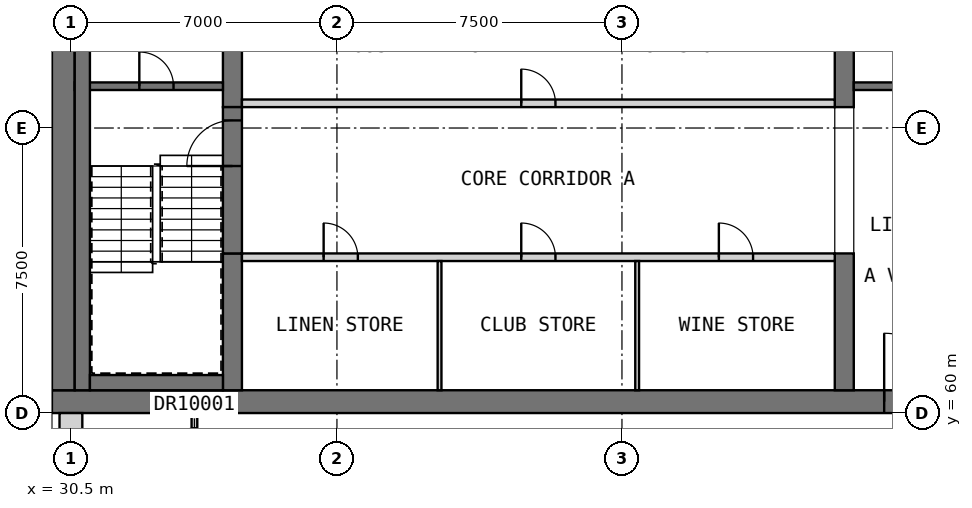
"""IFC4 building model, lengths in metres.
Left out: names, types, materials, properties, quantities, classifications, styles, units other than length and angle.
Written with IfcOpenShell. Run it as: python <this file> out.ifc"""

import sys

from ifc_helpers import new_model, si_unit, direction, frame, frame_2d, origin, place, context, subcontext, project, spatial, rectangle, extrude, element, fill, save


model = new_model("IFC4")
c1 = context("Model", 3, precision=1e-05, world=origin(), true_north=direction((0.0, 1.0)))
c2 = subcontext(c1, "Body", "Model", "MODEL_VIEW")
j1 = project(units=[si_unit("LENGTHUNIT", "METRE"), si_unit("PLANEANGLEUNIT", "RADIAN")], contexts=[c1])
p1 = place(None, origin())
s1 = spatial("IfcSite", under=j1, at=p1, CompositionType="ELEMENT")
p2 = place(p1, origin())
s2 = spatial("IfcBuilding", under=s1, at=p2, CompositionType="ELEMENT")
p3 = place(p2, frame((0.0, 0.0, 283.7)))
s3 = spatial("IfcBuildingStorey", under=s2, at=p3, CompositionType="ELEMENT", Elevation=283.7)
p4 = place(p3, frame((30.0, 60.3, 0.0), z_axis=(0.0, 0.0, 1.0), x_axis=(1.0, 0.0, 0.0)))
e1 = element("IfcWall", 1, at=p4, inside=s3, PredefinedType="SHEAR", context=c2, shape_type="SweptSolid", body=[
    extrude(rectangle(XDim=30.0, YDim=0.6, at=frame_2d((15.0, 0.0))), origin(), (0.0, 0.0, 1.0), 3.5),
])
p5 = place(p4, frame((21.9, 0.0, 0.0)))
e2 = element("IfcOpeningElement", 2, at=p5, cuts=e1, PredefinedType="OPENING", context=c2, shape_type="SweptSolid", body=[
    extrude(rectangle(XDim=1.8, YDim=2.1, at=frame_2d((0.9, 1.05))), frame((0.0, 0.31, 0.0), z_axis=(0.0, -1.0, 0.0), x_axis=(1.0, 0.0, 0.0)), (0.0, 0.0, 1.0), 0.62),
])
p6 = place(p4, frame((26.5, 0.0, 0.0)))
e3 = element("IfcOpeningElement", 3, at=p6, cuts=e1, PredefinedType="OPENING", context=c2, shape_type="SweptSolid", body=[
    extrude(rectangle(XDim=1.2, YDim=2.1, at=frame_2d((0.6, 1.05))), frame((0.0, 0.31, 0.0), z_axis=(0.0, -1.0, 0.0), x_axis=(1.0, 0.0, 0.0)), (0.0, 0.0, 1.0), 0.62),
])
p7 = place(p3, frame((30.3, 60.6, 0.0), z_axis=(0.0, 0.0, 1.0), x_axis=(0.0, 1.0, 0.0)))
e4 = element("IfcWall", 4, at=p7, inside=s3, PredefinedType="SHEAR", context=c2, shape_type="SweptSolid", body=[
    extrude(rectangle(XDim=21.3, YDim=0.6, at=frame_2d((10.65, 0.0))), origin(), (0.0, 0.0, 1.0), 3.5),
])
p8 = place(p3, frame((34.75, 60.6, 0.0), z_axis=(0.0, 0.0, 1.0), x_axis=(0.0, 1.0, 0.0)))
e5 = element("IfcWall", 5, at=p8, inside=s3, PredefinedType="SHEAR", context=c2, shape_type="SweptSolid", body=[
    extrude(rectangle(XDim=3.6, YDim=0.5, at=frame_2d((1.8, 0.0))), origin(), (0.0, 0.0, 1.0), 3.5),
])
p9 = place(p3, frame((34.75, 68.05, 0.0), z_axis=(0.0, 0.0, 1.0), x_axis=(0.0, 1.0, 0.0)))
e6 = element("IfcWall", 6, at=p9, inside=s3, PredefinedType="SHEAR", context=c2, shape_type="SweptSolid", body=[
    extrude(rectangle(XDim=6.4, YDim=0.5, at=frame_2d((3.2, 0.0))), origin(), (0.0, 0.0, 1.0), 3.5),
])
p10 = place(p3, frame((50.85, 60.6, 0.0), z_axis=(0.0, 0.0, 1.0), x_axis=(0.0, 1.0, 0.0)))
e7 = element("IfcWall", 7, at=p10, inside=s3, PredefinedType="SHEAR", context=c2, shape_type="SweptSolid", body=[
    extrude(rectangle(XDim=3.6, YDim=0.5, at=frame_2d((1.8, 0.0))), origin(), (0.0, 0.0, 1.0), 3.5),
])
p11 = place(p3, frame((50.85, 68.05, 0.0), z_axis=(0.0, 0.0, 1.0), x_axis=(0.0, 1.0, 0.0)))
e8 = element("IfcWall", 8, at=p11, inside=s3, PredefinedType="SHEAR", context=c2, shape_type="SweptSolid", body=[
    extrude(rectangle(XDim=6.4, YDim=0.5, at=frame_2d((3.2, 0.0))), origin(), (0.0, 0.0, 1.0), 3.5),
])
p12 = place(p3, frame((30.5, 60.0, 0.0), z_axis=(0.0, 0.0, 1.0), x_axis=(0.0, -1.0, 0.0)))
e9 = element("IfcWall", 9, at=p12, inside=s3, PredefinedType="SOLIDWALL", context=c2, shape_type="SweptSolid", body=[
    extrude(rectangle(XDim=7.0, YDim=0.6, at=frame_2d((3.5, 0.0))), origin(), (0.0, 0.0, 1.0), 3.2),
])
p13 = place(p12, frame((4.175, 0.0, 0.8)))
e10 = element("IfcOpeningElement", 10, at=p13, cuts=e9, PredefinedType="OPENING", context=c2, shape_type="SweptSolid", body=[
    extrude(rectangle(XDim=2.4, YDim=1.8, at=frame_2d((1.2, 0.9))), frame((0.0, 0.31, 0.0), z_axis=(0.0, -1.0, 0.0), x_axis=(1.0, 0.0, 0.0)), (0.0, 0.0, 1.0), 0.62),
])
p14 = place(p12, frame((0.675, 0.0, 0.8)))
e11 = element("IfcOpeningElement", 11, at=p14, cuts=e9, PredefinedType="OPENING", context=c2, shape_type="SweptSolid", body=[
    extrude(rectangle(XDim=2.4, YDim=1.8, at=frame_2d((1.2, 0.9))), frame((0.0, 0.31, 0.0), z_axis=(0.0, -1.0, 0.0), x_axis=(1.0, 0.0, 0.0)), (0.0, 0.0, 1.0), 0.62),
])
p15 = place(p3, frame((35.0, 64.1, 0.0), z_axis=(0.0, 0.0, 1.0), x_axis=(1.0, 0.0, 0.0)))
e12 = element("IfcWall", 12, at=p15, inside=s3, PredefinedType="PARTITIONING", context=c2, shape_type="SweptSolid", body=[
    extrude(rectangle(XDim=15.6, YDim=0.2, at=frame_2d((7.8, 0.0))), origin(), (0.0, 0.0, 1.0), 3.2),
])
p16 = place(p15, frame((2.15, 0.0, 0.0)))
e13 = element("IfcOpeningElement", 13, at=p16, cuts=e12, PredefinedType="OPENING", context=c2, shape_type="SweptSolid", body=[
    extrude(rectangle(XDim=0.9, YDim=2.1, at=frame_2d((0.45, 1.05))), frame((0.0, 0.11, 0.0), z_axis=(0.0, -1.0, 0.0), x_axis=(1.0, 0.0, 0.0)), (0.0, 0.0, 1.0), 0.22),
])
p17 = place(p15, frame((7.35, 0.0, 0.0)))
e14 = element("IfcOpeningElement", 14, at=p17, cuts=e12, PredefinedType="OPENING", context=c2, shape_type="SweptSolid", body=[
    extrude(rectangle(XDim=0.9, YDim=2.1, at=frame_2d((0.45, 1.05))), frame((0.0, 0.11, 0.0), z_axis=(0.0, -1.0, 0.0), x_axis=(1.0, 0.0, 0.0)), (0.0, 0.0, 1.0), 0.22),
])
p18 = place(p15, frame((12.55, 0.0, 0.0)))
e15 = element("IfcOpeningElement", 15, at=p18, cuts=e12, PredefinedType="OPENING", context=c2, shape_type="SweptSolid", body=[
    extrude(rectangle(XDim=0.9, YDim=2.1, at=frame_2d((0.45, 1.05))), frame((0.0, 0.11, 0.0), z_axis=(0.0, -1.0, 0.0), x_axis=(1.0, 0.0, 0.0)), (0.0, 0.0, 1.0), 0.22),
])
for number, where, z_axis, x_axis in (
    (16, (40.2, 60.6, 0.0), (0.0, 0.0, 1.0), (0.0, 1.0, 0.0)),
    (17, (45.4, 60.6, 0.0), (0.0, 0.0, 1.0), (0.0, 1.0, 0.0)),
):
    element("IfcWall", number, at=place(p3, frame(where, z_axis=z_axis, x_axis=x_axis)), inside=s3, PredefinedType="PARTITIONING", context=c2, shape_type="SweptSolid", body=[
        extrude(rectangle(XDim=3.4, YDim=0.1, at=frame_2d((1.7, 0.0))), origin(), (0.0, 0.0, 1.0), 3.2),
    ])
p19 = place(p3, frame((35.0, 68.15, 0.0), z_axis=(0.0, 0.0, 1.0), x_axis=(1.0, 0.0, 0.0)))
e18 = element("IfcWall", 18, at=p19, inside=s3, PredefinedType="PARTITIONING", context=c2, shape_type="SweptSolid", body=[
    extrude(rectangle(XDim=15.6, YDim=0.2, at=frame_2d((7.8, 0.0))), origin(), (0.0, 0.0, 1.0), 3.2),
])
p20 = place(p19, frame((7.35, 0.0, 0.0)))
e19 = element("IfcOpeningElement", 19, at=p20, cuts=e18, PredefinedType="OPENING", context=c2, shape_type="SweptSolid", body=[
    extrude(rectangle(XDim=0.9, YDim=2.1, at=frame_2d((0.45, 1.05))), frame((0.0, 0.11, 0.0), z_axis=(0.0, -1.0, 0.0), x_axis=(1.0, 0.0, 0.0)), (0.0, 0.0, 1.0), 0.22),
])
p21 = place(p3, frame((34.75, 64.2, 0.0), z_axis=(0.0, 0.0, 1.0), x_axis=(0.0, 1.0, 0.0)))
e20 = element("IfcWall", 20, at=p21, inside=s3, PredefinedType="SOLIDWALL", context=c2, shape_type="SweptSolid", body=[
    extrude(rectangle(XDim=3.85, YDim=0.5, at=frame_2d((1.925, 0.0))), origin(), (0.0, 0.0, 1.0), 2.3),
])
p22 = place(p21, frame((2.3, 0.0, 0.0)))
e21 = element("IfcOpeningElement", 21, at=p22, cuts=e20, PredefinedType="OPENING", context=c2, shape_type="SweptSolid", body=[
    extrude(rectangle(XDim=1.2, YDim=2.1, at=frame_2d((0.6, 1.05))), frame((0.0, 0.26, 0.0), z_axis=(0.0, -1.0, 0.0), x_axis=(1.0, 0.0, 0.0)), (0.0, 0.0, 1.0), 0.52),
])
p23 = place(p3, frame((30.6, 68.6, 0.0), z_axis=(0.0, 0.0, 1.0), x_axis=(1.0, 0.0, 0.0)))
e22 = element("IfcWall", 22, at=p23, inside=s3, PredefinedType="SOLIDWALL", context=c2, shape_type="SweptSolid", body=[
    extrude(rectangle(XDim=3.9, YDim=0.2, at=frame_2d((1.95, 0.0))), origin(), (0.0, 0.0, 1.0), 3.2),
])
p24 = place(p23, frame((1.7, 0.0, 0.0)))
e23 = element("IfcOpeningElement", 23, at=p24, cuts=e22, PredefinedType="OPENING", context=c2, shape_type="SweptSolid", body=[
    extrude(rectangle(XDim=0.9, YDim=2.1, at=frame_2d((0.45, 1.05))), frame((0.0, 0.11, 0.0), z_axis=(0.0, -1.0, 0.0), x_axis=(1.0, 0.0, 0.0)), (0.0, 0.0, 1.0), 0.22),
])
p25 = place(p3, frame((51.1, 68.6, 0.0), z_axis=(0.0, 0.0, 1.0), x_axis=(1.0, 0.0, 0.0)))
e24 = element("IfcWall", 24, at=p25, inside=s3, PredefinedType="SOLIDWALL", context=c2, shape_type="SweptSolid", body=[
    extrude(rectangle(XDim=8.3, YDim=0.2, at=frame_2d((4.15, 0.0))), origin(), (0.0, 0.0, 1.0), 3.2),
])
p26 = place(p3, frame((30.8, 60.6, 0.0), z_axis=(0.0, 0.0, 1.0), x_axis=(0.0, 1.0, 0.0)))
e25 = element("IfcWall", 25, at=p26, inside=s3, PredefinedType="SOLIDWALL", context=c2, shape_type="SweptSolid", body=[
    extrude(rectangle(XDim=21.3, YDim=0.4, at=frame_2d((10.65, 0.0))), origin(), (0.0, 0.0, 1.0), 3.2),
])
p27 = place(p3, frame((31.0, 60.8, 0.0), z_axis=(0.0, 0.0, 1.0), x_axis=(1.0, 0.0, 0.0)))
e26 = element("IfcWall", 26, at=p27, inside=s3, PredefinedType="SOLIDWALL", context=c2, shape_type="SweptSolid", body=[
    extrude(rectangle(XDim=3.5, YDim=0.4, at=frame_2d((1.75, 0.0))), origin(), (0.0, 0.0, 1.0), 3.2),
])
p28 = place(p3, frame((33.75, 58.275, 0.0), z_axis=(0.0, 0.0, 1.0), x_axis=(0.0, 1.0, 0.0)))
e27 = element("IfcWall", 27, at=p28, inside=s3, PredefinedType="PARTITIONING", context=c2, shape_type="SweptSolid", body=[
    extrude(rectangle(XDim=1.725, YDim=0.15, at=frame_2d((0.863, 0.0))), origin(), (0.0, 0.0, 1.0), 3.2),
])
p29 = place(p28, frame((0.325, 0.0, 0.0)))
e28 = element("IfcOpeningElement", 28, at=p29, cuts=e27, PredefinedType="OPENING", context=c2, shape_type="SweptSolid", body=[
    extrude(rectangle(XDim=1.0, YDim=2.1, at=frame_2d((0.5, 1.05))), frame((0.0, 0.085, 0.0), z_axis=(0.0, -1.0, 0.0), x_axis=(1.0, 0.0, 0.0)), (0.0, 0.0, 1.0), 0.17),
])
p30 = place(p16, origin())
e29 = element("IfcDoor", 29, at=p30, inside=s3, OperationType="SINGLE_SWING_LEFT", PredefinedType="DOOR", context=c2, shape_type="SweptSolid", body=[
    extrude(rectangle(XDim=0.9, YDim=2.1, at=frame_2d((0.45, 1.05))), frame((0.0, 0.025, 0.0), z_axis=(0.0, -1.0, 0.0), x_axis=(1.0, 0.0, 0.0)), (0.0, 0.0, 1.0), 0.05),
])
fill(e13, e29)
p31 = place(p17, origin())
e30 = element("IfcDoor", 30, at=p31, inside=s3, OperationType="SINGLE_SWING_RIGHT", PredefinedType="DOOR", context=c2, shape_type="SweptSolid", body=[
    extrude(rectangle(XDim=0.9, YDim=2.1, at=frame_2d((0.45, 1.05))), frame((0.0, 0.025, 0.0), z_axis=(0.0, -1.0, 0.0), x_axis=(1.0, 0.0, 0.0)), (0.0, 0.0, 1.0), 0.05),
])
fill(e14, e30)
p32 = place(p18, origin())
e31 = element("IfcDoor", 31, at=p32, inside=s3, OperationType="SINGLE_SWING_LEFT", PredefinedType="DOOR", context=c2, shape_type="SweptSolid", body=[
    extrude(rectangle(XDim=0.9, YDim=2.1, at=frame_2d((0.45, 1.05))), frame((0.0, 0.025, 0.0), z_axis=(0.0, -1.0, 0.0), x_axis=(1.0, 0.0, 0.0)), (0.0, 0.0, 1.0), 0.05),
])
fill(e15, e31)
p33 = place(p20, origin())
e32 = element("IfcDoor", 32, at=p33, inside=s3, OperationType="SINGLE_SWING_LEFT", PredefinedType="DOOR", context=c2, shape_type="SweptSolid", body=[
    extrude(rectangle(XDim=0.9, YDim=2.1, at=frame_2d((0.45, 1.05))), frame((0.0, 0.025, 0.0), z_axis=(0.0, -1.0, 0.0), x_axis=(1.0, 0.0, 0.0)), (0.0, 0.0, 1.0), 0.05),
])
fill(e19, e32)
p34 = place(p5, origin())
e33 = element("IfcDoor", 33, at=p34, inside=s3, OperationType="DOUBLE_DOOR_SINGLE_SWING", PredefinedType="DOOR", context=c2, shape_type="SweptSolid", body=[
    extrude(rectangle(XDim=1.8, YDim=2.1, at=frame_2d((0.9, 1.05))), frame((0.0, 0.025, 0.0), z_axis=(0.0, -1.0, 0.0), x_axis=(1.0, 0.0, 0.0)), (0.0, 0.0, 1.0), 0.05),
])
fill(e2, e33)
p35 = place(p22, origin())
e34 = element("IfcDoor", 34, at=p35, inside=s3, OperationType="SINGLE_SWING_LEFT", PredefinedType="DOOR", context=c2, shape_type="SweptSolid", body=[
    extrude(rectangle(XDim=1.2, YDim=2.1, at=frame_2d((0.6, 1.05))), frame((0.0, 0.025, 0.0), z_axis=(0.0, -1.0, 0.0), x_axis=(1.0, 0.0, 0.0)), (0.0, 0.0, 1.0), 0.05),
])
fill(e21, e34)
p36 = place(p24, origin())
e35 = element("IfcDoor", 35, at=p36, inside=s3, OperationType="SINGLE_SWING_LEFT", PredefinedType="DOOR", context=c2, shape_type="SweptSolid", body=[
    extrude(rectangle(XDim=0.9, YDim=2.1, at=frame_2d((0.45, 1.05))), frame((0.0, 0.025, 0.0), z_axis=(0.0, -1.0, 0.0), x_axis=(1.0, 0.0, 0.0)), (0.0, 0.0, 1.0), 0.05),
])
fill(e23, e35)
save(model, sys.argv[1])
